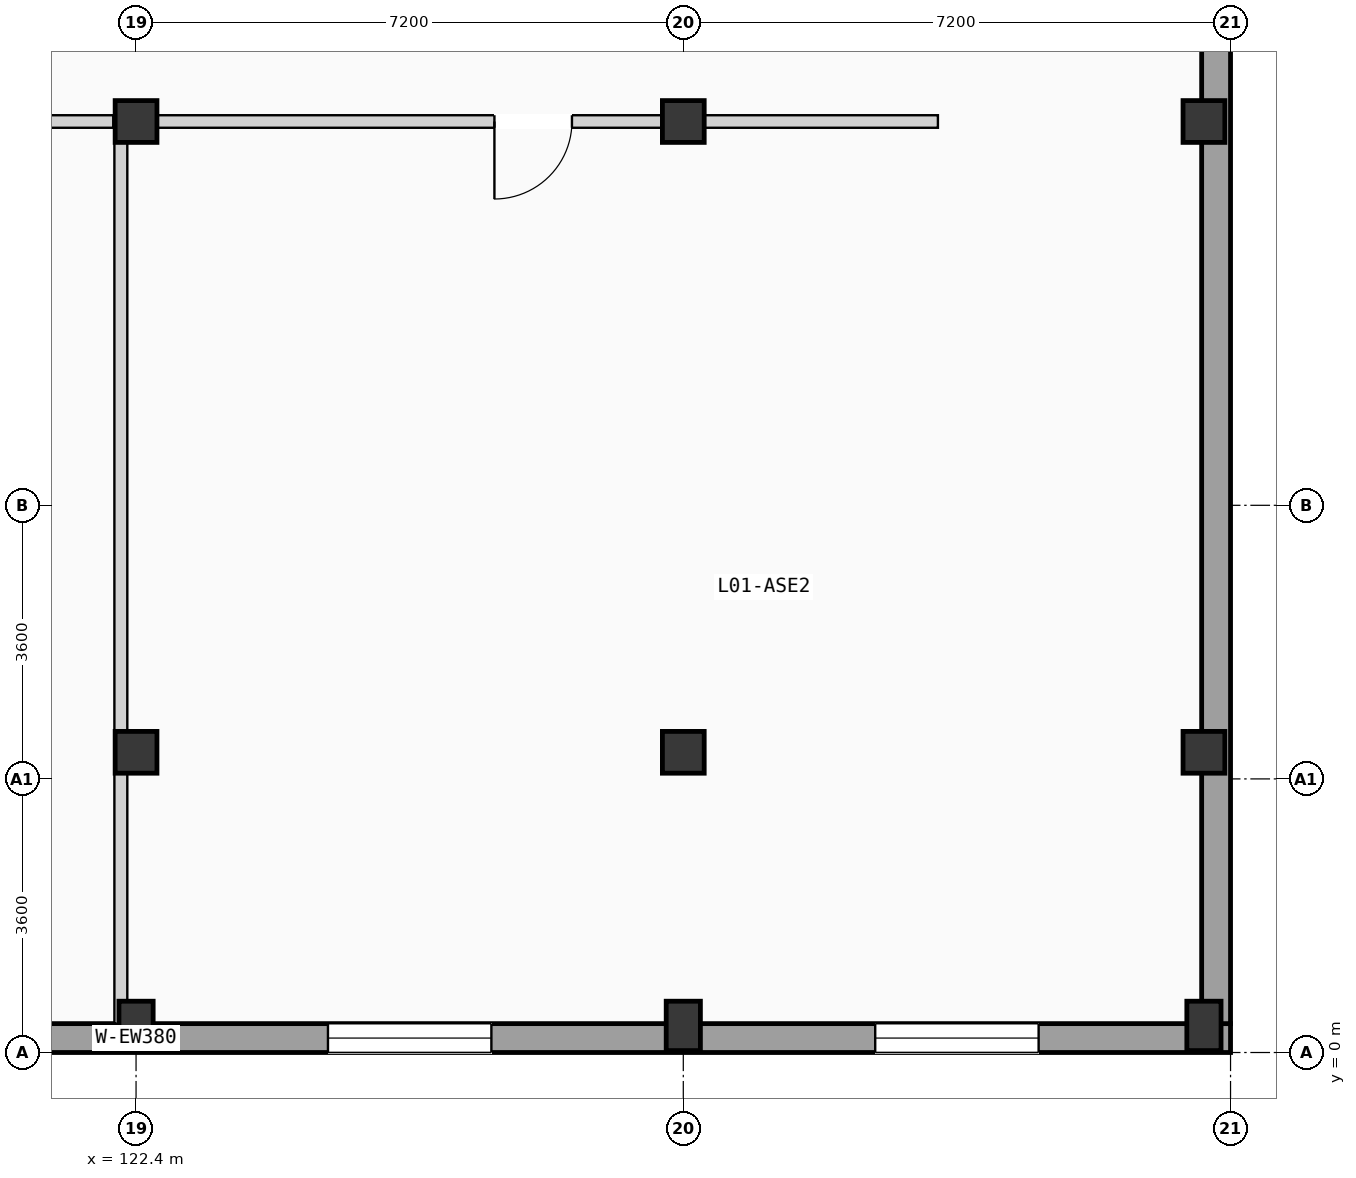
"""IFC4 building model, lengths in metres.
Left out: names, types, materials, properties, quantities, classifications, styles, units other than length and angle.
Written with IfcOpenShell. Run it as: python <this file> out.ifc"""

import sys

from ifc_helpers import new_model, si_unit, direction, frame, frame_2d, origin, origin_2d, place, context, subcontext, project, spatial, rectangle, extrude, element, fill, save


model = new_model("IFC4")
c1 = context("Model", 3, precision=1e-05, world=origin(), true_north=direction((0.0, 1.0)))
c2 = subcontext(c1, "Body", "Model", "MODEL_VIEW")
j1 = project(units=[si_unit("LENGTHUNIT", "METRE"), si_unit("PLANEANGLEUNIT", "RADIAN")], contexts=[c1])
p1 = place(None, origin())
s1 = spatial("IfcSite", under=j1, at=p1, CompositionType="ELEMENT")
p2 = place(p1, origin())
s2 = spatial("IfcBuilding", under=s1, at=p2, CompositionType="ELEMENT")
p3 = place(p2, frame((0.0, 0.0, 4.9)))
s3 = spatial("IfcBuildingStorey", under=s2, at=p3, CompositionType="ELEMENT", Elevation=4.9)
p4 = place(p3, frame((122.4, 0.35, 0.0), z_axis=(0.0, 0.0, 1.0), x_axis=(1.0, 0.0, 0.0)))
e1 = element("IfcColumn", 1, at=p4, inside=s3, PredefinedType="PILASTER", context=c2, shape_type="SweptSolid", body=[
    extrude(rectangle(XDim=0.45, YDim=0.65, at=origin_2d()), origin(), (0.0, 0.0, 1.0), 3.675),
])
for number, where, z_axis, x_axis in (
    (2, (122.4, 3.95, 0.0), (0.0, 0.0, 1.0), (1.0, 0.0, 0.0)),
    (3, (122.4, 12.25, 0.0), (0.0, 0.0, 1.0), (1.0, 0.0, 0.0)),
):
    element("IfcColumn", number, at=place(p3, frame(where, z_axis=z_axis, x_axis=x_axis)), inside=s3, PredefinedType="COLUMN", context=c2, shape_type="SweptSolid", body=[
        extrude(rectangle(XDim=0.55, YDim=0.55, at=origin_2d()), origin(), (0.0, 0.0, 1.0), 3.675),
    ])
p5 = place(p3, frame((129.6, 0.35, 0.0), z_axis=(0.0, 0.0, 1.0), x_axis=(1.0, 0.0, 0.0)))
e4 = element("IfcColumn", 4, at=p5, inside=s3, PredefinedType="PILASTER", context=c2, shape_type="SweptSolid", body=[
    extrude(rectangle(XDim=0.45, YDim=0.65, at=origin_2d()), origin(), (0.0, 0.0, 1.0), 3.675),
])
for number, where, z_axis, x_axis in (
    (5, (129.6, 3.95, 0.0), (0.0, 0.0, 1.0), (1.0, 0.0, 0.0)),
    (6, (129.6, 12.25, 0.0), (0.0, 0.0, 1.0), (1.0, 0.0, 0.0)),
):
    element("IfcColumn", number, at=place(p3, frame(where, z_axis=z_axis, x_axis=x_axis)), inside=s3, PredefinedType="COLUMN", context=c2, shape_type="SweptSolid", body=[
        extrude(rectangle(XDim=0.55, YDim=0.55, at=origin_2d()), origin(), (0.0, 0.0, 1.0), 3.675),
    ])
p6 = place(p3, frame((136.45, 0.35, 0.0), z_axis=(0.0, 0.0, 1.0), x_axis=(1.0, 0.0, 0.0)))
e7 = element("IfcColumn", 7, at=p6, inside=s3, PredefinedType="PILASTER", context=c2, shape_type="SweptSolid", body=[
    extrude(rectangle(XDim=0.45, YDim=0.65, at=origin_2d()), origin(), (0.0, 0.0, 1.0), 3.675),
])
for number, where, z_axis, x_axis in (
    (8, (136.45, 3.95, 0.0), (0.0, 0.0, 1.0), (1.0, 0.0, 0.0)),
    (9, (136.45, 12.25, 0.0), (0.0, 0.0, 1.0), (1.0, 0.0, 0.0)),
):
    element("IfcColumn", number, at=place(p3, frame(where, z_axis=z_axis, x_axis=x_axis)), inside=s3, PredefinedType="COLUMN", context=c2, shape_type="SweptSolid", body=[
        extrude(rectangle(XDim=0.55, YDim=0.55, at=origin_2d()), origin(), (0.0, 0.0, 1.0), 3.675),
    ])
p7 = place(p3, frame((108.0, 0.19, 0.0), z_axis=(0.0, 0.0, 1.0), x_axis=(1.0, 0.0, 0.0)))
e10 = element("IfcWall", 10, at=p7, inside=s3, PredefinedType="SOLIDWALL", context=c2, shape_type="SweptSolid", body=[
    extrude(rectangle(XDim=28.8, YDim=0.38, at=frame_2d((14.4, 0.0))), origin(), (0.0, 0.0, 1.0), 3.4),
])
p8 = place(p7, frame((2.6, 0.0, 0.85)))
e11 = element("IfcOpeningElement", 11, at=p8, cuts=e10, PredefinedType="OPENING", context=c2, shape_type="SweptSolid", body=[
    extrude(rectangle(XDim=2.0, YDim=1.35, at=frame_2d((1.0, 0.675))), frame((0.0, 0.2, 0.0), z_axis=(0.0, -1.0, 0.0), x_axis=(1.0, 0.0, 0.0)), (0.0, 0.0, 1.0), 0.4),
])
p9 = place(p7, frame((9.8, 0.0, 0.85)))
e12 = element("IfcOpeningElement", 12, at=p9, cuts=e10, PredefinedType="OPENING", context=c2, shape_type="SweptSolid", body=[
    extrude(rectangle(XDim=2.0, YDim=1.35, at=frame_2d((1.0, 0.675))), frame((0.0, 0.2, 0.0), z_axis=(0.0, -1.0, 0.0), x_axis=(1.0, 0.0, 0.0)), (0.0, 0.0, 1.0), 0.4),
])
p10 = place(p7, frame((16.925, 0.0, 0.85)))
e13 = element("IfcOpeningElement", 13, at=p10, cuts=e10, PredefinedType="OPENING", context=c2, shape_type="SweptSolid", body=[
    extrude(rectangle(XDim=2.15, YDim=1.2, at=frame_2d((1.075, 0.6))), frame((0.0, 0.2, 0.0), z_axis=(0.0, -1.0, 0.0), x_axis=(1.0, 0.0, 0.0)), (0.0, 0.0, 1.0), 0.4),
])
p11 = place(p7, frame((24.125, 0.0, 0.85)))
e14 = element("IfcOpeningElement", 14, at=p11, cuts=e10, PredefinedType="OPENING", context=c2, shape_type="SweptSolid", body=[
    extrude(rectangle(XDim=2.15, YDim=1.35, at=frame_2d((1.075, 0.675))), frame((0.0, 0.2, 0.0), z_axis=(0.0, -1.0, 0.0), x_axis=(1.0, 0.0, 0.0)), (0.0, 0.0, 1.0), 0.4),
])
p12 = place(p3, frame((136.61, 0.38, 0.0), z_axis=(0.0, 0.0, 1.0), x_axis=(0.0, 1.0, 0.0)))
e15 = element("IfcWall", 15, at=p12, inside=s3, PredefinedType="SOLIDWALL", context=c2, shape_type="SweptSolid", body=[
    extrude(rectangle(XDim=20.84, YDim=0.38, at=frame_2d((10.42, 0.0))), origin(), (0.0, 0.0, 1.0), 3.4),
])
p13 = place(p3, frame((111.85, 12.25, 0.0), z_axis=(0.0, 0.0, 1.0), x_axis=(1.0, 0.0, 0.0)))
e16 = element("IfcWall", 16, at=p13, inside=s3, PredefinedType="PARTITIONING", context=c2, shape_type="SweptSolid", body=[
    extrude(rectangle(XDim=10.25, YDim=0.165, at=frame_2d((5.125, 0.0))), origin(), (0.0, 0.0, 1.0), 2.72),
])
p14 = place(p13, frame((4.615, 0.0, 0.0)))
e17 = element("IfcOpeningElement", 17, at=p14, cuts=e16, PredefinedType="OPENING", context=c2, shape_type="SweptSolid", body=[
    extrude(rectangle(XDim=1.02, YDim=2.16, at=frame_2d((0.51, 1.08))), frame((0.0, 0.093, 0.0), z_axis=(0.0, -1.0, 0.0), x_axis=(1.0, 0.0, 0.0)), (0.0, 0.0, 1.0), 0.185),
])
p15 = place(p3, frame((122.3, 12.25, 0.0), z_axis=(0.0, 0.0, 1.0), x_axis=(1.0, 0.0, 0.0)))
e18 = element("IfcWall", 18, at=p15, inside=s3, PredefinedType="PARTITIONING", context=c2, shape_type="SweptSolid", body=[
    extrude(rectangle(XDim=10.65, YDim=0.165, at=frame_2d((5.325, 0.0))), origin(), (0.0, 0.0, 1.0), 2.72),
])
p16 = place(p15, frame((4.815, 0.0, 0.0)))
e19 = element("IfcOpeningElement", 19, at=p16, cuts=e18, PredefinedType="OPENING", context=c2, shape_type="SweptSolid", body=[
    extrude(rectangle(XDim=1.02, YDim=2.16, at=frame_2d((0.51, 1.08))), frame((0.0, 0.093, 0.0), z_axis=(0.0, -1.0, 0.0), x_axis=(1.0, 0.0, 0.0)), (0.0, 0.0, 1.0), 0.185),
])
p17 = place(p3, frame((122.2, 0.38, 0.0), z_axis=(0.0, 0.0, 1.0), x_axis=(0.0, 1.0, 0.0)))
e20 = element("IfcWall", 20, at=p17, inside=s3, PredefinedType="PARTITIONING", context=c2, shape_type="SweptSolid", body=[
    extrude(rectangle(XDim=11.788, YDim=0.17, at=frame_2d((5.894, 0.0))), origin(), (0.0, 0.0, 1.0), 2.77),
])
p18 = place(p10, origin())
e21 = element("IfcWindow", 21, at=p18, inside=s3, PartitioningType="DOUBLE_PANEL_VERTICAL", PredefinedType="WINDOW", context=c2, shape_type="SweptSolid", body=[
    extrude(rectangle(XDim=2.15, YDim=1.2, at=frame_2d((1.075, 0.6))), frame((0.0, 0.03, 0.0), z_axis=(0.0, -1.0, 0.0), x_axis=(1.0, 0.0, 0.0)), (0.0, 0.0, 1.0), 0.06),
])
fill(e13, e21)
p19 = place(p11, origin())
e22 = element("IfcWindow", 22, at=p19, inside=s3, PartitioningType="DOUBLE_PANEL_VERTICAL", PredefinedType="WINDOW", context=c2, shape_type="SweptSolid", body=[
    extrude(rectangle(XDim=2.15, YDim=1.35, at=frame_2d((1.075, 0.675))), frame((0.0, 0.03, 0.0), z_axis=(0.0, -1.0, 0.0), x_axis=(1.0, 0.0, 0.0)), (0.0, 0.0, 1.0), 0.06),
])
fill(e14, e22)
p20 = place(p16, frame((1.02, 0.0, 0.0), z_axis=(0.0, 0.0, 1.0), x_axis=(-1.0, 0.0, 0.0)))
e23 = element("IfcDoor", 23, at=p20, inside=s3, OperationType="SINGLE_SWING_LEFT", PredefinedType="DOOR", context=c2, shape_type="SweptSolid", body=[
    extrude(rectangle(XDim=1.02, YDim=2.16, at=frame_2d((0.51, 1.08))), frame((0.0, 0.025, 0.0), z_axis=(0.0, -1.0, 0.0), x_axis=(1.0, 0.0, 0.0)), (0.0, 0.0, 1.0), 0.05),
])
fill(e19, e23)
save(model, sys.argv[1])
